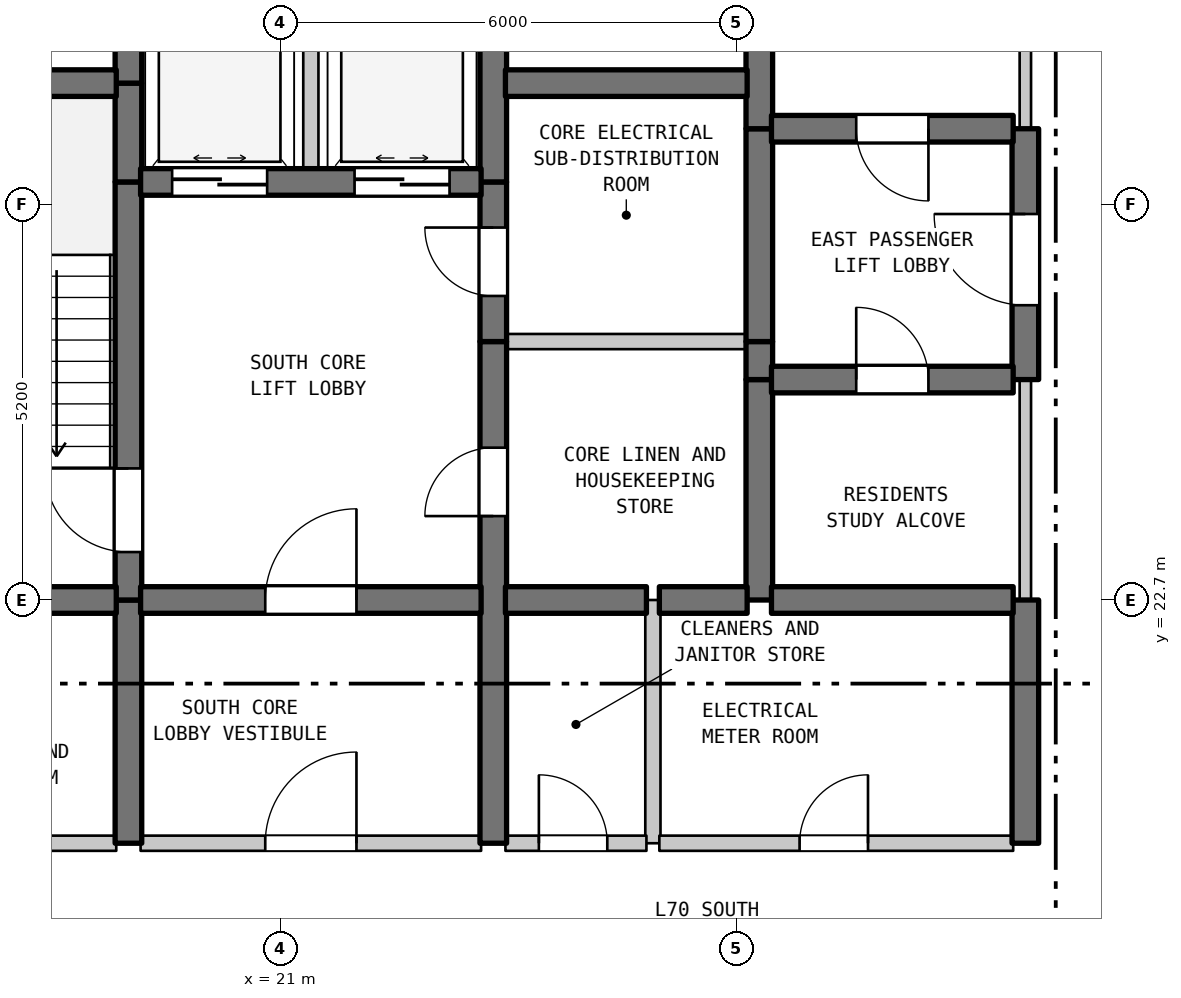
"""IFC4 building model, lengths in metres.
Left out: names, types, materials, properties, quantities, classifications, styles, units other than length and angle.
Written with IfcOpenShell. Run it as: python <this file> out.ifc"""

import sys

from ifc_helpers import new_model, si_unit, direction, frame, frame_2d, origin, place, context, subcontext, project, spatial, rectangle, extrude, element, fill, save


model = new_model("IFC4")
c1 = context("Model", 3, precision=1e-05, world=origin(), true_north=direction((0.0, 1.0)))
c2 = subcontext(c1, "Body", "Model", "MODEL_VIEW")
j1 = project(units=[si_unit("LENGTHUNIT", "METRE"), si_unit("PLANEANGLEUNIT", "RADIAN")], contexts=[c1])
p1 = place(None, origin())
s1 = spatial("IfcSite", under=j1, at=p1, CompositionType="ELEMENT")
p2 = place(p1, origin())
s2 = spatial("IfcBuilding", under=s1, at=p2, CompositionType="ELEMENT")
p3 = place(p2, frame((0.0, 0.0, 280.6)))
s3 = spatial("IfcBuildingStorey", under=s2, at=p3, CompositionType="ELEMENT", Elevation=280.6)
p4 = place(p3, frame((19.0, 19.5, 0.0), z_axis=(0.0, 0.0, 1.0), x_axis=(0.0, 1.0, 0.0)))
e1 = element("IfcWall", 1, at=p4, inside=s3, PredefinedType="SHEAR", context=c2, shape_type="SweptSolid", body=[
    extrude(rectangle(XDim=3.2, YDim=0.35, at=frame_2d((1.6, 0.0))), origin(), (0.0, 0.0, 1.0), 3.39),
])
p5 = place(p3, frame((19.0, 22.7, 0.0), z_axis=(0.0, 0.0, 1.0), x_axis=(0.0, 1.0, 0.0)))
e2 = element("IfcWall", 2, at=p5, inside=s3, PredefinedType="SHEAR", context=c2, shape_type="SweptSolid", body=[
    extrude(rectangle(XDim=5.5, YDim=0.35, at=frame_2d((2.75, 0.0))), origin(), (0.0, 0.0, 1.0), 3.39),
])
p6 = place(p5, frame((0.631, 0.0, 0.0)))
e3 = element("IfcOpeningElement", 3, at=p6, cuts=e2, PredefinedType="OPENING", context=c2, shape_type="SweptSolid", body=[
    extrude(rectangle(XDim=1.1, YDim=2.15, at=frame_2d((0.55, 1.075))), frame((0.0, 0.185, 0.0), z_axis=(0.0, -1.0, 0.0), x_axis=(1.0, 0.0, 0.0)), (0.0, 0.0, 1.0), 0.37),
])
p7 = place(p3, frame((19.0, 28.2, 0.0), z_axis=(0.0, 0.0, 1.0), x_axis=(0.0, 1.0, 0.0)))
e4 = element("IfcWall", 4, at=p7, inside=s3, PredefinedType="SHEAR", context=c2, shape_type="SweptSolid", body=[
    extrude(rectangle(XDim=1.3, YDim=0.35, at=frame_2d((0.65, 0.0))), origin(), (0.0, 0.0, 1.0), 3.39),
])
p8 = place(p3, frame((19.0, 29.5, 0.0), z_axis=(0.0, 0.0, 1.0), x_axis=(0.0, 1.0, 0.0)))
e5 = element("IfcWall", 5, at=p8, inside=s3, PredefinedType="SHEAR", context=c2, shape_type="SweptSolid", body=[
    extrude(rectangle(XDim=5.5, YDim=0.35, at=frame_2d((2.75, 0.0))), origin(), (0.0, 0.0, 1.0), 3.39),
])
p9 = place(p8, frame((2.025, 0.0, 0.0)))
e6 = element("IfcOpeningElement", 6, at=p9, cuts=e5, PredefinedType="OPENING", context=c2, shape_type="SweptSolid", body=[
    extrude(rectangle(XDim=1.1, YDim=2.15, at=frame_2d((0.55, 1.075))), frame((0.0, 0.185, 0.0), z_axis=(0.0, -1.0, 0.0), x_axis=(1.0, 0.0, 0.0)), (0.0, 0.0, 1.0), 0.37),
])
p10 = place(p3, frame((21.4, 28.2, 0.0), z_axis=(0.0, 0.0, 1.0), x_axis=(0.0, 1.0, 0.0)))
e7 = element("IfcWall", 7, at=p10, inside=s3, PredefinedType="STANDARD", context=c2, shape_type="SweptSolid", body=[
    extrude(rectangle(XDim=2.6, YDim=0.2, at=frame_2d((1.3, 0.0))), origin(), (0.0, 0.0, 1.0), 3.39),
])
p11 = place(p3, frame((23.8, 19.5, 0.0), z_axis=(0.0, 0.0, 1.0), x_axis=(0.0, 1.0, 0.0)))
e8 = element("IfcWall", 8, at=p11, inside=s3, PredefinedType="SHEAR", context=c2, shape_type="SweptSolid", body=[
    extrude(rectangle(XDim=6.6, YDim=0.35, at=frame_2d((3.3, 0.0))), origin(), (0.0, 0.0, 1.0), 3.39),
])
p12 = place(p11, frame((4.304, 0.0, 0.0)))
e9 = element("IfcOpeningElement", 9, at=p12, cuts=e8, PredefinedType="OPENING", context=c2, shape_type="SweptSolid", body=[
    extrude(rectangle(XDim=0.9, YDim=2.15, at=frame_2d((0.45, 1.075))), frame((0.0, 0.185, 0.0), z_axis=(0.0, -1.0, 0.0), x_axis=(1.0, 0.0, 0.0)), (0.0, 0.0, 1.0), 0.37),
])
p13 = place(p3, frame((23.8, 26.1, 0.0), z_axis=(0.0, 0.0, 1.0), x_axis=(0.0, 1.0, 0.0)))
e10 = element("IfcWall", 10, at=p13, inside=s3, PredefinedType="SHEAR", context=c2, shape_type="SweptSolid", body=[
    extrude(rectangle(XDim=2.1, YDim=0.35, at=frame_2d((1.05, 0.0))), origin(), (0.0, 0.0, 1.0), 3.39),
])
p14 = place(p13, frame((0.6, 0.0, 0.0)))
e11 = element("IfcOpeningElement", 11, at=p14, cuts=e10, PredefinedType="OPENING", context=c2, shape_type="SweptSolid", body=[
    extrude(rectangle(XDim=0.9, YDim=2.15, at=frame_2d((0.45, 1.075))), frame((0.0, 0.185, 0.0), z_axis=(0.0, -1.0, 0.0), x_axis=(1.0, 0.0, 0.0)), (0.0, 0.0, 1.0), 0.37),
])
p15 = place(p3, frame((23.8, 28.2, 0.0), z_axis=(0.0, 0.0, 1.0), x_axis=(0.0, 1.0, 0.0)))
e12 = element("IfcWall", 12, at=p15, inside=s3, PredefinedType="SHEAR", context=c2, shape_type="SweptSolid", body=[
    extrude(rectangle(XDim=2.6, YDim=0.35, at=frame_2d((1.3, 0.0))), origin(), (0.0, 0.0, 1.0), 3.39),
])
p16 = place(p3, frame((25.9, 19.5, 0.0), z_axis=(0.0, 0.0, 1.0), x_axis=(0.0, 1.0, 0.0)))
e13 = element("IfcWall", 13, at=p16, inside=s3, PredefinedType="STANDARD", context=c2, shape_type="SweptSolid", body=[
    extrude(rectangle(XDim=3.2, YDim=0.2, at=frame_2d((1.6, 0.0))), origin(), (0.0, 0.0, 1.0), 3.39),
])
p17 = place(p3, frame((27.3, 22.7, 0.0), z_axis=(0.0, 0.0, 1.0), x_axis=(0.0, 1.0, 0.0)))
e14 = element("IfcWall", 14, at=p17, inside=s3, PredefinedType="SHEAR", context=c2, shape_type="SweptSolid", body=[
    extrude(rectangle(XDim=2.9, YDim=0.35, at=frame_2d((1.45, 0.0))), origin(), (0.0, 0.0, 1.0), 3.39),
])
p18 = place(p3, frame((27.3, 25.6, 0.0), z_axis=(0.0, 0.0, 1.0), x_axis=(0.0, 1.0, 0.0)))
e15 = element("IfcWall", 15, at=p18, inside=s3, PredefinedType="SHEAR", context=c2, shape_type="SweptSolid", body=[
    extrude(rectangle(XDim=0.5, YDim=0.35, at=frame_2d((0.25, 0.0))), origin(), (0.0, 0.0, 1.0), 3.39),
])
p19 = place(p3, frame((27.3, 26.1, 0.0), z_axis=(0.0, 0.0, 1.0), x_axis=(0.0, 1.0, 0.0)))
e16 = element("IfcWall", 16, at=p19, inside=s3, PredefinedType="SHEAR", context=c2, shape_type="SweptSolid", body=[
    extrude(rectangle(XDim=2.8, YDim=0.35, at=frame_2d((1.4, 0.0))), origin(), (0.0, 0.0, 1.0), 3.39),
])
p20 = place(p3, frame((27.3, 28.9, 0.0), z_axis=(0.0, 0.0, 1.0), x_axis=(0.0, 1.0, 0.0)))
e17 = element("IfcWall", 17, at=p20, inside=s3, PredefinedType="SHEAR", context=c2, shape_type="SweptSolid", body=[
    extrude(rectangle(XDim=2.6, YDim=0.35, at=frame_2d((1.3, 0.0))), origin(), (0.0, 0.0, 1.0), 3.39),
])
p21 = place(p3, frame((30.8, 19.5, 0.0), z_axis=(0.0, 0.0, 1.0), x_axis=(0.0, 1.0, 0.0)))
e18 = element("IfcWall", 18, at=p21, inside=s3, PredefinedType="SHEAR", context=c2, shape_type="SweptSolid", body=[
    extrude(rectangle(XDim=3.2, YDim=0.35, at=frame_2d((1.6, 0.0))), origin(), (0.0, 0.0, 1.0), 3.39),
])
p22 = place(p3, frame((30.8, 22.7, 0.0), z_axis=(0.0, 0.0, 1.0), x_axis=(0.0, 1.0, 0.0)))
e19 = element("IfcWall", 19, at=p22, inside=s3, PredefinedType="STANDARD", context=c2, shape_type="SweptSolid", body=[
    extrude(rectangle(XDim=2.9, YDim=0.15, at=frame_2d((1.45, 0.0))), origin(), (0.0, 0.0, 1.0), 3.39),
])
p23 = place(p3, frame((30.8, 25.6, 0.0), z_axis=(0.0, 0.0, 1.0), x_axis=(0.0, 1.0, 0.0)))
e20 = element("IfcWall", 20, at=p23, inside=s3, PredefinedType="SHEAR", context=c2, shape_type="SweptSolid", body=[
    extrude(rectangle(XDim=3.3, YDim=0.35, at=frame_2d((1.65, 0.0))), origin(), (0.0, 0.0, 1.0), 3.39),
])
p24 = place(p23, frame((0.978, 0.0, 0.0)))
e21 = element("IfcOpeningElement", 21, at=p24, cuts=e20, PredefinedType="OPENING", context=c2, shape_type="SweptSolid", body=[
    extrude(rectangle(XDim=1.2, YDim=2.2, at=frame_2d((0.6, 1.1))), frame((0.0, 0.185, 0.0), z_axis=(0.0, -1.0, 0.0), x_axis=(1.0, 0.0, 0.0)), (0.0, 0.0, 1.0), 0.37),
])
p25 = place(p3, frame((30.8, 28.9, 0.0), z_axis=(0.0, 0.0, 1.0), x_axis=(0.0, 1.0, 0.0)))
e22 = element("IfcWall", 22, at=p25, inside=s3, PredefinedType="STANDARD", context=c2, shape_type="SweptSolid", body=[
    extrude(rectangle(XDim=2.6, YDim=0.15, at=frame_2d((1.3, 0.0))), origin(), (0.0, 0.0, 1.0), 3.39),
])
p26 = place(p3, frame((15.16, 19.5, 0.0), z_axis=(0.0, 0.0, 1.0), x_axis=(1.0, 0.0, 0.0)))
e23 = element("IfcWall", 23, at=p26, inside=s3, PredefinedType="STANDARD", context=c2, shape_type="SweptSolid", body=[
    extrude(rectangle(XDim=3.68, YDim=0.2, at=frame_2d((1.84, 0.0))), origin(), (0.0, 0.0, 1.0), 3.39),
])
p27 = place(p26, frame((1.39, 0.0, 0.0)))
e24 = element("IfcOpeningElement", 24, at=p27, cuts=e23, PredefinedType="OPENING", context=c2, shape_type="SweptSolid", body=[
    extrude(rectangle(XDim=0.9, YDim=2.15, at=frame_2d((0.45, 1.075))), frame((0.0, 0.11, 0.0), z_axis=(0.0, -1.0, 0.0), x_axis=(1.0, 0.0, 0.0)), (0.0, 0.0, 1.0), 0.22),
])
p28 = place(p3, frame((19.16, 19.5, 0.0), z_axis=(0.0, 0.0, 1.0), x_axis=(1.0, 0.0, 0.0)))
e25 = element("IfcWall", 25, at=p28, inside=s3, PredefinedType="STANDARD", context=c2, shape_type="SweptSolid", body=[
    extrude(rectangle(XDim=4.48, YDim=0.2, at=frame_2d((2.24, 0.0))), origin(), (0.0, 0.0, 1.0), 3.39),
])
p29 = place(p28, frame((1.64, 0.0, 0.0)))
e26 = element("IfcOpeningElement", 26, at=p29, cuts=e25, PredefinedType="OPENING", context=c2, shape_type="SweptSolid", body=[
    extrude(rectangle(XDim=1.2, YDim=2.2, at=frame_2d((0.6, 1.1))), frame((0.0, 0.11, 0.0), z_axis=(0.0, -1.0, 0.0), x_axis=(1.0, 0.0, 0.0)), (0.0, 0.0, 1.0), 0.22),
])
p30 = place(p3, frame((23.96, 19.5, 0.0), z_axis=(0.0, 0.0, 1.0), x_axis=(1.0, 0.0, 0.0)))
e27 = element("IfcWall", 27, at=p30, inside=s3, PredefinedType="STANDARD", context=c2, shape_type="SweptSolid", body=[
    extrude(rectangle(XDim=1.855, YDim=0.2, at=frame_2d((0.927, 0.0))), origin(), (0.0, 0.0, 1.0), 3.39),
])
p31 = place(p30, frame((0.44, 0.0, 0.0)))
e28 = element("IfcOpeningElement", 28, at=p31, cuts=e27, PredefinedType="OPENING", context=c2, shape_type="SweptSolid", body=[
    extrude(rectangle(XDim=0.9, YDim=2.15, at=frame_2d((0.45, 1.075))), frame((0.0, 0.11, 0.0), z_axis=(0.0, -1.0, 0.0), x_axis=(1.0, 0.0, 0.0)), (0.0, 0.0, 1.0), 0.22),
])
p32 = place(p3, frame((25.985, 19.5, 0.0), z_axis=(0.0, 0.0, 1.0), x_axis=(1.0, 0.0, 0.0)))
e29 = element("IfcWall", 29, at=p32, inside=s3, PredefinedType="STANDARD", context=c2, shape_type="SweptSolid", body=[
    extrude(rectangle(XDim=4.655, YDim=0.2, at=frame_2d((2.327, 0.0))), origin(), (0.0, 0.0, 1.0), 3.39),
])
p33 = place(p32, frame((1.845, 0.0, 0.0)))
e30 = element("IfcOpeningElement", 30, at=p33, cuts=e29, PredefinedType="OPENING", context=c2, shape_type="SweptSolid", body=[
    extrude(rectangle(XDim=0.9, YDim=2.15, at=frame_2d((0.45, 1.075))), frame((0.0, 0.11, 0.0), z_axis=(0.0, -1.0, 0.0), x_axis=(1.0, 0.0, 0.0)), (0.0, 0.0, 1.0), 0.22),
])
p34 = place(p3, frame((15.16, 22.7, 0.0), z_axis=(0.0, 0.0, 1.0), x_axis=(1.0, 0.0, 0.0)))
e31 = element("IfcWall", 31, at=p34, inside=s3, PredefinedType="SHEAR", context=c2, shape_type="SweptSolid", body=[
    extrude(rectangle(XDim=3.68, YDim=0.35, at=frame_2d((1.84, 0.0))), origin(), (0.0, 0.0, 1.0), 3.39),
])
p35 = place(p3, frame((19.16, 22.7, 0.0), z_axis=(0.0, 0.0, 1.0), x_axis=(1.0, 0.0, 0.0)))
e32 = element("IfcWall", 32, at=p35, inside=s3, PredefinedType="SHEAR", context=c2, shape_type="SweptSolid", body=[
    extrude(rectangle(XDim=4.48, YDim=0.35, at=frame_2d((2.24, 0.0))), origin(), (0.0, 0.0, 1.0), 3.39),
])
p36 = place(p35, frame((1.64, 0.0, 0.0)))
e33 = element("IfcOpeningElement", 33, at=p36, cuts=e32, PredefinedType="OPENING", context=c2, shape_type="SweptSolid", body=[
    extrude(rectangle(XDim=1.2, YDim=2.2, at=frame_2d((0.6, 1.1))), frame((0.0, 0.185, 0.0), z_axis=(0.0, -1.0, 0.0), x_axis=(1.0, 0.0, 0.0)), (0.0, 0.0, 1.0), 0.37),
])
p37 = place(p3, frame((23.96, 22.7, 0.0), z_axis=(0.0, 0.0, 1.0), x_axis=(1.0, 0.0, 0.0)))
e34 = element("IfcWall", 34, at=p37, inside=s3, PredefinedType="SHEAR", context=c2, shape_type="SweptSolid", body=[
    extrude(rectangle(XDim=1.855, YDim=0.35, at=frame_2d((0.927, 0.0))), origin(), (0.0, 0.0, 1.0), 3.39),
])
p38 = place(p3, frame((25.985, 22.7, 0.0), z_axis=(0.0, 0.0, 1.0), x_axis=(1.0, 0.0, 0.0)))
e35 = element("IfcWall", 35, at=p38, inside=s3, PredefinedType="SHEAR", context=c2, shape_type="SweptSolid", body=[
    extrude(rectangle(XDim=1.155, YDim=0.35, at=frame_2d((0.577, 0.0))), origin(), (0.0, 0.0, 1.0), 3.39),
])
p39 = place(p3, frame((27.46, 22.7, 0.0), z_axis=(0.0, 0.0, 1.0), x_axis=(1.0, 0.0, 0.0)))
e36 = element("IfcWall", 36, at=p39, inside=s3, PredefinedType="SHEAR", context=c2, shape_type="SweptSolid", body=[
    extrude(rectangle(XDim=3.18, YDim=0.35, at=frame_2d((1.59, 0.0))), origin(), (0.0, 0.0, 1.0), 3.39),
])
p40 = place(p3, frame((27.46, 25.6, 0.0), z_axis=(0.0, 0.0, 1.0), x_axis=(1.0, 0.0, 0.0)))
e37 = element("IfcWall", 37, at=p40, inside=s3, PredefinedType="SHEAR", context=c2, shape_type="SweptSolid", body=[
    extrude(rectangle(XDim=3.18, YDim=0.35, at=frame_2d((1.59, 0.0))), origin(), (0.0, 0.0, 1.0), 3.39),
])
p41 = place(p40, frame((1.115, 0.0, 0.0)))
e38 = element("IfcOpeningElement", 38, at=p41, cuts=e37, PredefinedType="OPENING", context=c2, shape_type="SweptSolid", body=[
    extrude(rectangle(XDim=0.95, YDim=2.15, at=frame_2d((0.475, 1.075))), frame((0.0, 0.185, 0.0), z_axis=(0.0, -1.0, 0.0), x_axis=(1.0, 0.0, 0.0)), (0.0, 0.0, 1.0), 0.37),
])
p42 = place(p3, frame((23.96, 26.1, 0.0), z_axis=(0.0, 0.0, 1.0), x_axis=(1.0, 0.0, 0.0)))
e39 = element("IfcWall", 39, at=p42, inside=s3, PredefinedType="STANDARD", context=c2, shape_type="SweptSolid", body=[
    extrude(rectangle(XDim=3.18, YDim=0.2, at=frame_2d((1.59, 0.0))), origin(), (0.0, 0.0, 1.0), 3.39),
])
p43 = place(p3, frame((19.16, 28.2, 0.0), z_axis=(0.0, 0.0, 1.0), x_axis=(1.0, 0.0, 0.0)))
e40 = element("IfcWall", 40, at=p43, inside=s3, PredefinedType="SHEAR", context=c2, shape_type="SweptSolid", body=[
    extrude(rectangle(XDim=4.48, YDim=0.35, at=frame_2d((2.24, 0.0))), origin(), (0.0, 0.0, 1.0), 3.39),
])
p44 = place(p43, frame((0.415, 0.0, 0.0)))
e41 = element("IfcOpeningElement", 41, at=p44, cuts=e40, PredefinedType="OPENING", context=c2, shape_type="SweptSolid", body=[
    extrude(rectangle(XDim=1.25, YDim=2.2, at=frame_2d((0.625, 1.1))), frame((0.0, 0.185, 0.0), z_axis=(0.0, -1.0, 0.0), x_axis=(1.0, 0.0, 0.0)), (0.0, 0.0, 1.0), 0.37),
])
p45 = place(p43, frame((2.815, 0.0, 0.0)))
e42 = element("IfcOpeningElement", 42, at=p45, cuts=e40, PredefinedType="OPENING", context=c2, shape_type="SweptSolid", body=[
    extrude(rectangle(XDim=1.25, YDim=2.2, at=frame_2d((0.625, 1.1))), frame((0.0, 0.185, 0.0), z_axis=(0.0, -1.0, 0.0), x_axis=(1.0, 0.0, 0.0)), (0.0, 0.0, 1.0), 0.37),
])
p46 = place(p3, frame((27.46, 28.9, 0.0), z_axis=(0.0, 0.0, 1.0), x_axis=(1.0, 0.0, 0.0)))
e43 = element("IfcWall", 43, at=p46, inside=s3, PredefinedType="SHEAR", context=c2, shape_type="SweptSolid", body=[
    extrude(rectangle(XDim=3.18, YDim=0.35, at=frame_2d((1.59, 0.0))), origin(), (0.0, 0.0, 1.0), 3.39),
])
p47 = place(p46, frame((1.115, 0.0, 0.0)))
e44 = element("IfcOpeningElement", 44, at=p47, cuts=e43, PredefinedType="OPENING", context=c2, shape_type="SweptSolid", body=[
    extrude(rectangle(XDim=0.95, YDim=2.15, at=frame_2d((0.475, 1.075))), frame((0.0, 0.185, 0.0), z_axis=(0.0, -1.0, 0.0), x_axis=(1.0, 0.0, 0.0)), (0.0, 0.0, 1.0), 0.37),
])
p48 = place(p3, frame((15.16, 29.5, 0.0), z_axis=(0.0, 0.0, 1.0), x_axis=(1.0, 0.0, 0.0)))
e45 = element("IfcWall", 45, at=p48, inside=s3, PredefinedType="SHEAR", context=c2, shape_type="SweptSolid", body=[
    extrude(rectangle(XDim=3.68, YDim=0.35, at=frame_2d((1.84, 0.0))), origin(), (0.0, 0.0, 1.0), 3.39),
])
p49 = place(p3, frame((23.96, 29.5, 0.0), z_axis=(0.0, 0.0, 1.0), x_axis=(1.0, 0.0, 0.0)))
e46 = element("IfcWall", 46, at=p49, inside=s3, PredefinedType="SHEAR", context=c2, shape_type="SweptSolid", body=[
    extrude(rectangle(XDim=3.18, YDim=0.35, at=frame_2d((1.59, 0.0))), origin(), (0.0, 0.0, 1.0), 3.39),
])
p50 = place(p6, origin())
e47 = element("IfcDoor", 47, at=p50, inside=s3, OperationType="SINGLE_SWING_RIGHT", PredefinedType="DOOR", context=c2, shape_type="SweptSolid", body=[
    extrude(rectangle(XDim=1.1, YDim=2.15, at=frame_2d((0.55, 1.075))), frame((0.0, 0.025, 0.0), z_axis=(0.0, -1.0, 0.0), x_axis=(1.0, 0.0, 0.0)), (0.0, 0.0, 1.0), 0.05),
])
fill(e3, e47)
p51 = place(p12, origin())
e48 = element("IfcDoor", 48, at=p51, inside=s3, OperationType="SINGLE_SWING_LEFT", PredefinedType="DOOR", context=c2, shape_type="SweptSolid", body=[
    extrude(rectangle(XDim=0.9, YDim=2.15, at=frame_2d((0.45, 1.075))), frame((0.0, 0.025, 0.0), z_axis=(0.0, -1.0, 0.0), x_axis=(1.0, 0.0, 0.0)), (0.0, 0.0, 1.0), 0.05),
])
fill(e9, e48)
p52 = place(p14, origin())
e49 = element("IfcDoor", 49, at=p52, inside=s3, OperationType="SINGLE_SWING_RIGHT", PredefinedType="DOOR", context=c2, shape_type="SweptSolid", body=[
    extrude(rectangle(XDim=0.9, YDim=2.15, at=frame_2d((0.45, 1.075))), frame((0.0, 0.025, 0.0), z_axis=(0.0, -1.0, 0.0), x_axis=(1.0, 0.0, 0.0)), (0.0, 0.0, 1.0), 0.05),
])
fill(e11, e49)
p53 = place(p24, origin())
e50 = element("IfcDoor", 50, at=p53, inside=s3, OperationType="SINGLE_SWING_RIGHT", PredefinedType="DOOR", context=c2, shape_type="SweptSolid", body=[
    extrude(rectangle(XDim=1.2, YDim=2.2, at=frame_2d((0.6, 1.1))), frame((0.0, 0.025, 0.0), z_axis=(0.0, -1.0, 0.0), x_axis=(1.0, 0.0, 0.0)), (0.0, 0.0, 1.0), 0.05),
])
fill(e21, e50)
p54 = place(p29, origin())
e51 = element("IfcDoor", 51, at=p54, inside=s3, OperationType="SINGLE_SWING_RIGHT", PredefinedType="DOOR", context=c2, shape_type="SweptSolid", body=[
    extrude(rectangle(XDim=1.2, YDim=2.2, at=frame_2d((0.6, 1.1))), frame((0.0, 0.025, 0.0), z_axis=(0.0, -1.0, 0.0), x_axis=(1.0, 0.0, 0.0)), (0.0, 0.0, 1.0), 0.05),
])
fill(e26, e51)
p55 = place(p31, origin())
e52 = element("IfcDoor", 52, at=p55, inside=s3, OperationType="SINGLE_SWING_LEFT", PredefinedType="DOOR", context=c2, shape_type="SweptSolid", body=[
    extrude(rectangle(XDim=0.9, YDim=2.15, at=frame_2d((0.45, 1.075))), frame((0.0, 0.025, 0.0), z_axis=(0.0, -1.0, 0.0), x_axis=(1.0, 0.0, 0.0)), (0.0, 0.0, 1.0), 0.05),
])
fill(e28, e52)
p56 = place(p33, origin())
e53 = element("IfcDoor", 53, at=p56, inside=s3, OperationType="SINGLE_SWING_RIGHT", PredefinedType="DOOR", context=c2, shape_type="SweptSolid", body=[
    extrude(rectangle(XDim=0.9, YDim=2.15, at=frame_2d((0.45, 1.075))), frame((0.0, 0.025, 0.0), z_axis=(0.0, -1.0, 0.0), x_axis=(1.0, 0.0, 0.0)), (0.0, 0.0, 1.0), 0.05),
])
fill(e30, e53)
p57 = place(p36, origin())
e54 = element("IfcDoor", 54, at=p57, inside=s3, OperationType="SINGLE_SWING_RIGHT", PredefinedType="DOOR", context=c2, shape_type="SweptSolid", body=[
    extrude(rectangle(XDim=1.2, YDim=2.2, at=frame_2d((0.6, 1.1))), frame((0.0, 0.025, 0.0), z_axis=(0.0, -1.0, 0.0), x_axis=(1.0, 0.0, 0.0)), (0.0, 0.0, 1.0), 0.05),
])
fill(e33, e54)
p58 = place(p41, origin())
e55 = element("IfcDoor", 55, at=p58, inside=s3, OperationType="SINGLE_SWING_LEFT", PredefinedType="DOOR", context=c2, shape_type="SweptSolid", body=[
    extrude(rectangle(XDim=0.95, YDim=2.15, at=frame_2d((0.475, 1.075))), frame((0.0, 0.025, 0.0), z_axis=(0.0, -1.0, 0.0), x_axis=(1.0, 0.0, 0.0)), (0.0, 0.0, 1.0), 0.05),
])
fill(e38, e55)
p59 = place(p44, origin())
e56 = element("IfcDoor", 56, at=p59, inside=s3, OperationType="DOUBLE_DOOR_SLIDING", PredefinedType="DOOR", context=c2, shape_type="SweptSolid", body=[
    extrude(rectangle(XDim=1.25, YDim=2.2, at=frame_2d((0.625, 1.1))), frame((0.0, 0.025, 0.0), z_axis=(0.0, -1.0, 0.0), x_axis=(1.0, 0.0, 0.0)), (0.0, 0.0, 1.0), 0.05),
])
fill(e41, e56)
p60 = place(p45, origin())
e57 = element("IfcDoor", 57, at=p60, inside=s3, OperationType="DOUBLE_DOOR_SLIDING", PredefinedType="DOOR", context=c2, shape_type="SweptSolid", body=[
    extrude(rectangle(XDim=1.25, YDim=2.2, at=frame_2d((0.625, 1.1))), frame((0.0, 0.025, 0.0), z_axis=(0.0, -1.0, 0.0), x_axis=(1.0, 0.0, 0.0)), (0.0, 0.0, 1.0), 0.05),
])
fill(e42, e57)
p61 = place(p47, frame((0.95, 0.0, 0.0), z_axis=(0.0, 0.0, 1.0), x_axis=(-1.0, 0.0, 0.0)))
e58 = element("IfcDoor", 58, at=p61, inside=s3, OperationType="SINGLE_SWING_RIGHT", PredefinedType="DOOR", context=c2, shape_type="SweptSolid", body=[
    extrude(rectangle(XDim=0.95, YDim=2.15, at=frame_2d((0.475, 1.075))), frame((0.0, 0.025, 0.0), z_axis=(0.0, -1.0, 0.0), x_axis=(1.0, 0.0, 0.0)), (0.0, 0.0, 1.0), 0.05),
])
fill(e44, e58)
save(model, sys.argv[1])
